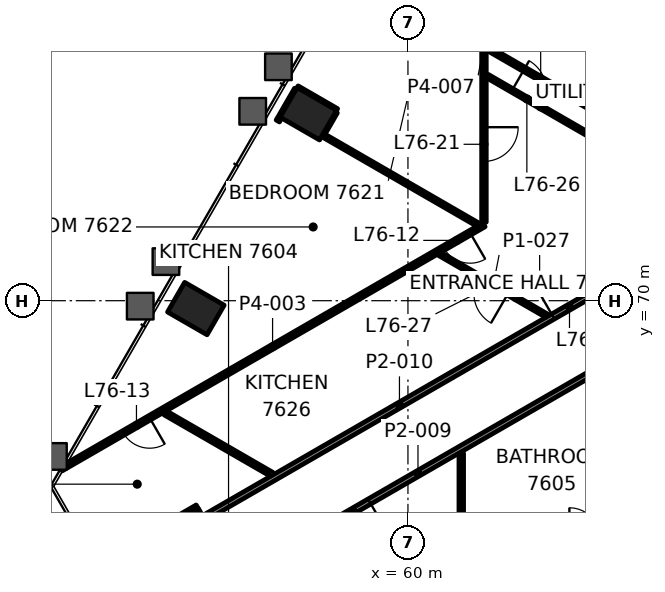
"""IFC4 building model, lengths in metres.
Left out: names, types, materials, properties, quantities, classifications, styles, units other than length and angle.
Written with IfcOpenShell. Run it as: python <this file> out.ifc"""

import sys

from ifc_helpers import new_model, si_unit, direction, frame, frame_2d, origin, origin_2d, place, context, subcontext, project, spatial, rectangle, hollow_rectangle, extrude, element, fill, save


model = new_model("IFC4")
c1 = context("Model", 3, precision=1e-05, world=origin(), true_north=direction((0.0, 1.0)))
c2 = subcontext(c1, "Body", "Model", "MODEL_VIEW")
j1 = project(units=[si_unit("LENGTHUNIT", "METRE"), si_unit("PLANEANGLEUNIT", "RADIAN")], contexts=[c1])
p1 = place(None, origin())
s1 = spatial("IfcSite", under=j1, at=p1, CompositionType="ELEMENT")
p2 = place(p1, origin())
s2 = spatial("IfcBuilding", under=s1, at=p2, CompositionType="ELEMENT")
p3 = place(p2, frame((0.0, 0.0, 312.6)))
s3 = spatial("IfcBuildingStorey", under=s2, at=p3, CompositionType="ELEMENT", Elevation=312.6)
p4 = place(p3, frame((54.039, 62.898, 0.0), z_axis=(0.0, 0.0, 1.0), x_axis=(0.5, -0.866025403784, 0.0)))
e1 = element("IfcColumn", 1, at=p4, inside=s3, PredefinedType="COLUMN", context=c2, shape_type="SweptSolid", body=[
    extrude(rectangle(XDim=2.4, YDim=2.4, at=origin_2d()), origin(), (0.0, 0.0, 1.0), 3.5),
])
for number, where, z_axis, x_axis in (
    (2, (57.379, 74.919, -0.0), (0.0, 0.0, 1.0), (-0.5, -0.866, 0.0)),
    (3, (54.419, 69.793, -0.0), (0.0, 0.0, 1.0), (-0.5, -0.866, 0.0)),
):
    element("IfcColumn", number, at=place(p3, frame(where, z_axis=z_axis, x_axis=x_axis)), inside=s3, PredefinedType="COLUMN", context=c2, shape_type="SweptSolid", body=[
        extrude(hollow_rectangle(XDim=0.9, YDim=1.2, WallThickness=0.06, at=origin_2d()), origin(), (0.0, 0.0, 1.0), 3.5),
    ])
p5 = place(p3, frame((65.0, 68.187, 0.0), z_axis=(0.0, 0.0, 1.0), x_axis=(-0.866028339337, -0.499994915439, 0.0)))
e4 = element("IfcWall", 4, at=p5, inside=s3, PredefinedType="PARTITIONING", context=c2, shape_type="SweptSolid", body=[
    extrude(rectangle(XDim=10.937, YDim=0.15, at=frame_2d((5.468, 0.0))), origin(), (0.0, 0.0, 1.0), 2.697),
])
p6 = place(p5, frame((6.943, 0.0, 0.0)))
e5 = element("IfcOpeningElement", 5, at=p6, cuts=e4, PredefinedType="OPENING", context=c2, shape_type="SweptSolid", body=[
    extrude(rectangle(XDim=1.0, YDim=2.1, at=frame_2d((0.5, 1.05))), frame((0.0, 0.085, 0.0), z_axis=(0.0, -1.0, 0.0), x_axis=(1.0, 0.0, 0.0)), (0.0, 0.0, 1.0), 0.17),
])
p7 = place(p3, frame((54.628, 64.278, 0.0), z_axis=(0.0, 0.0, 1.0), x_axis=(0.866033426221, 0.499986104476, 0.0)))
e6 = element("IfcWall", 6, at=p7, inside=s3, PredefinedType="PARTITIONING", context=c2, shape_type="SweptSolid", body=[
    extrude(rectangle(XDim=11.89, YDim=0.15, at=frame_2d((5.945, 0.0))), origin(), (0.0, 0.0, 1.0), 2.7),
])
p8 = place(p7, frame((10.612, 0.0, 0.0)))
e7 = element("IfcOpeningElement", 7, at=p8, cuts=e6, PredefinedType="OPENING", context=c2, shape_type="SweptSolid", body=[
    extrude(rectangle(XDim=1.0, YDim=2.1, at=frame_2d((0.5, 1.05))), frame((0.0, 0.085, 0.0), z_axis=(0.0, -1.0, 0.0), x_axis=(1.0, 0.0, 0.0)), (0.0, 0.0, 1.0), 0.17),
])
p9 = place(p3, frame((52.4, 63.337, 0.0), z_axis=(0.0, 0.0, 1.0), x_axis=(0.866024647952, 0.500001309137, 0.0)))
e8 = element("IfcWall", 8, at=p9, inside=s3, PredefinedType="PARTITIONING", context=c2, shape_type="SweptSolid", body=[
    extrude(rectangle(XDim=2.4, YDim=0.2, at=frame_2d((1.2, 0.0))), origin(), (0.0, 0.0, 1.0), 2.7),
])
p10 = place(p3, frame((62.0, 71.998, 0.0), z_axis=(0.0, 0.0, 1.0), x_axis=(-0.866023842607, -0.500002704028, 0.0)))
e9 = element("IfcWall", 9, at=p10, inside=s3, PredefinedType="PARTITIONING", context=c2, shape_type="SweptSolid", body=[
    extrude(rectangle(XDim=12.845, YDim=0.12, at=frame_2d((6.422, 0.0))), origin(), (0.0, 0.0, 1.0), 2.7),
])
p11 = place(p10, frame((0.421, 0.0, 0.0)))
e10 = element("IfcOpeningElement", 10, at=p11, cuts=e9, PredefinedType="OPENING", context=c2, shape_type="SweptSolid", body=[
    extrude(rectangle(XDim=0.8, YDim=2.1, at=frame_2d((0.4, 1.05))), frame((0.0, 0.07, 0.0), z_axis=(0.0, -1.0, 0.0), x_axis=(1.0, 0.0, 0.0)), (0.0, 0.0, 1.0), 0.14),
])
p12 = place(p10, frame((10.158, 0.0, 0.0)))
e11 = element("IfcOpeningElement", 11, at=p12, cuts=e9, PredefinedType="OPENING", context=c2, shape_type="SweptSolid", body=[
    extrude(rectangle(XDim=0.8, YDim=2.1, at=frame_2d((0.4, 1.05))), frame((0.0, 0.07, 0.0), z_axis=(0.0, -1.0, 0.0), x_axis=(1.0, 0.0, 0.0)), (0.0, 0.0, 1.0), 0.14),
])
p13 = place(p3, frame((57.776, 74.406, 0.0), z_axis=(0.0, 0.0, 1.0), x_axis=(0.500246099629, 0.865883271467, 0.0)))
e12 = element("IfcWall", 12, at=p13, inside=s3, PredefinedType="PARTITIONING", context=c2, shape_type="SweptSolid", body=[
    extrude(rectangle(XDim=0.646, YDim=0.1, at=frame_2d((0.323, 0.0))), origin(), (0.0, 0.0, 1.0), 2.7),
])
p14 = place(p3, frame((56.576, 74.729, 0.0), z_axis=(0.0, 0.0, 1.0), x_axis=(0.500079715141, 0.865979375335, 0.0)))
e13 = element("IfcWall", 13, at=p14, inside=s3, PredefinedType="PARTITIONING", context=c2, shape_type="SweptSolid", body=[
    extrude(rectangle(XDim=0.966, YDim=0.1, at=frame_2d((0.483, 0.0))), origin(), (0.0, 0.0, 1.0), 2.7),
])
p15 = place(p3, frame((62.0, 81.366, 0.0), z_axis=(0.0, 0.0, 1.0), x_axis=(0.0, -1.0, 0.0)))
e14 = element("IfcWall", 14, at=p15, inside=s3, PredefinedType="PARTITIONING", context=c2, shape_type="SweptSolid", body=[
    extrude(rectangle(XDim=9.299, YDim=0.12, at=frame_2d((4.649, 0.0))), origin(), (0.0, 0.0, 1.0), 2.7),
])
p16 = place(p15, frame((2.033, 0.0, 0.0)))
e15 = element("IfcOpeningElement", 15, at=p16, cuts=e14, PredefinedType="OPENING", context=c2, shape_type="SweptSolid", body=[
    extrude(rectangle(XDim=0.8, YDim=2.1, at=frame_2d((0.4, 1.05))), frame((0.0, 0.07, 0.0), z_axis=(0.0, -1.0, 0.0), x_axis=(1.0, 0.0, 0.0)), (0.0, 0.0, 1.0), 0.14),
])
p17 = place(p15, frame((6.8, 0.0, 0.0)))
e16 = element("IfcOpeningElement", 16, at=p17, cuts=e14, PredefinedType="OPENING", context=c2, shape_type="SweptSolid", body=[
    extrude(rectangle(XDim=0.9, YDim=2.1, at=frame_2d((0.45, 1.05))), frame((0.0, 0.07, 0.0), z_axis=(0.0, -1.0, 0.0), x_axis=(1.0, 0.0, 0.0)), (0.0, 0.0, 1.0), 0.14),
])
p18 = place(p3, frame((61.403, 62.756, 0.0), z_axis=(0.0, 0.0, 1.0), x_axis=(0.0, 1.0, 0.0)))
e17 = element("IfcWall", 17, at=p18, inside=s3, PredefinedType="PARTITIONING", context=c2, shape_type="SweptSolid", body=[
    extrude(rectangle(XDim=3.228, YDim=0.12, at=frame_2d((1.614, 0.0))), origin(), (0.0, 0.0, 1.0), 2.697),
])
p19 = place(p3, frame((64.89, 75.031, 0.0), z_axis=(0.0, 0.0, 1.0), x_axis=(-0.866033195618, 0.499986503906, 0.0)))
e18 = element("IfcWall", 18, at=p19, inside=s3, PredefinedType="PARTITIONING", context=c2, shape_type="SweptSolid", body=[
    extrude(rectangle(XDim=3.228, YDim=0.12, at=frame_2d((1.614, 0.0))), origin(), (0.0, 0.0, 1.0), 2.7),
])
p20 = place(p3, frame((62.086, 75.912, 0.0), z_axis=(0.0, 0.0, 1.0), x_axis=(0.866032882975, -0.499987045439, 0.0)))
e19 = element("IfcWall", 19, at=p20, inside=s3, PredefinedType="PARTITIONING", context=c2, shape_type="SweptSolid", body=[
    extrude(rectangle(XDim=3.248, YDim=0.1, at=frame_2d((1.624, 0.0))), origin(), (0.0, 0.0, 1.0), 2.7),
])
p21 = place(p20, frame((0.754, 0.0, 0.0)))
e20 = element("IfcOpeningElement", 20, at=p21, cuts=e19, PredefinedType="OPENING", context=c2, shape_type="SweptSolid", body=[
    extrude(rectangle(XDim=0.9, YDim=2.1, at=frame_2d((0.45, 1.05))), frame((0.0, 0.06, 0.0), z_axis=(0.0, -1.0, 0.0), x_axis=(1.0, 0.0, 0.0)), (0.0, 0.0, 1.0), 0.12),
])
p22 = place(p3, frame((58.124, 75.01, 0.0), z_axis=(0.0, 0.0, 1.0), x_axis=(-0.865978732077, 0.500080829057, 0.0)))
e21 = element("IfcWall", 21, at=p22, inside=s3, PredefinedType="PARTITIONING", context=c2, shape_type="SweptSolid", body=[
    extrude(rectangle(XDim=1.199, YDim=0.1, at=frame_2d((0.6, 0.0))), origin(), (0.0, 0.0, 1.0), 2.688),
])
p23 = place(p3, frame((61.837, 72.003, 0.0), z_axis=(0.0, 0.0, 1.0), x_axis=(-0.86602790099, 0.499995674689, 0.0)))
e22 = element("IfcWall", 22, at=p23, inside=s3, PredefinedType="PARTITIONING", context=c2, shape_type="SweptSolid", body=[
    extrude(rectangle(XDim=4.718, YDim=0.1, at=frame_2d((2.359, 0.0))), origin(), (0.0, 0.0, 1.0), 2.7),
])
p24 = place(p3, frame((63.652, 69.604, 0.0), z_axis=(0.0, 0.0, 1.0), x_axis=(-0.866032882975, 0.499987045439, 0.0)))
e23 = element("IfcWall", 23, at=p24, inside=s3, PredefinedType="PARTITIONING", context=c2, shape_type="SweptSolid", body=[
    extrude(rectangle(XDim=3.248, YDim=0.1, at=frame_2d((1.624, 0.0))), origin(), (0.0, 0.0, 1.0), 2.7),
])
p25 = place(p24, frame((1.174, 0.0, 0.0)))
e24 = element("IfcOpeningElement", 24, at=p25, cuts=e23, PredefinedType="OPENING", context=c2, shape_type="SweptSolid", body=[
    extrude(rectangle(XDim=0.9, YDim=2.1, at=frame_2d((0.45, 1.05))), frame((0.0, 0.06, 0.0), z_axis=(0.0, -1.0, 0.0), x_axis=(1.0, 0.0, 0.0)), (0.0, 0.0, 1.0), 0.12),
])
p26 = place(p3, frame((56.41, 65.433, 0.0), z_axis=(0.0, 0.0, 1.0), x_axis=(-0.866000447062, 0.500043223821, 0.0)))
e25 = element("IfcWall", 25, at=p26, inside=s3, PredefinedType="PARTITIONING", context=c2, shape_type="SweptSolid", body=[
    extrude(rectangle(XDim=3.228, YDim=0.12, at=frame_2d((1.614, 0.0))), origin(), (0.0, 0.0, 1.0), 2.7),
])
p27 = place(p6, origin())
e26 = element("IfcDoor", 26, at=p27, inside=s3, OperationType="SINGLE_SWING_LEFT", PredefinedType="DOOR", context=c2, shape_type="SweptSolid", body=[
    extrude(rectangle(XDim=1.0, YDim=2.1, at=frame_2d((0.5, 1.05))), frame((0.0, 0.025, 0.0), z_axis=(0.0, -1.0, 0.0), x_axis=(1.0, 0.0, 0.0)), (0.0, 0.0, 1.0), 0.05),
])
fill(e5, e26)
p28 = place(p8, origin())
e27 = element("IfcDoor", 27, at=p28, inside=s3, OperationType="SINGLE_SWING_RIGHT", PredefinedType="DOOR", context=c2, shape_type="SweptSolid", body=[
    extrude(rectangle(XDim=1.0, YDim=2.1, at=frame_2d((0.5, 1.05))), frame((0.0, 0.025, 0.0), z_axis=(0.0, -1.0, 0.0), x_axis=(1.0, 0.0, 0.0)), (0.0, 0.0, 1.0), 0.05),
])
fill(e7, e27)
p29 = place(p11, origin())
e28 = element("IfcDoor", 28, at=p29, inside=s3, OperationType="SINGLE_SWING_RIGHT", PredefinedType="DOOR", context=c2, shape_type="SweptSolid", body=[
    extrude(rectangle(XDim=0.8, YDim=2.1, at=frame_2d((0.4, 1.05))), frame((0.0, 0.025, 0.0), z_axis=(0.0, -1.0, 0.0), x_axis=(1.0, 0.0, 0.0)), (0.0, 0.0, 1.0), 0.05),
])
fill(e10, e28)
p30 = place(p12, origin())
e29 = element("IfcDoor", 29, at=p30, inside=s3, OperationType="SINGLE_SWING_RIGHT", PredefinedType="DOOR", context=c2, shape_type="SweptSolid", body=[
    extrude(rectangle(XDim=0.8, YDim=2.1, at=frame_2d((0.4, 1.05))), frame((0.0, 0.025, 0.0), z_axis=(0.0, -1.0, 0.0), x_axis=(1.0, 0.0, 0.0)), (0.0, 0.0, 1.0), 0.05),
])
fill(e11, e29)
p31 = place(p17, origin())
e30 = element("IfcDoor", 30, at=p31, inside=s3, OperationType="SINGLE_SWING_RIGHT", PredefinedType="DOOR", context=c2, shape_type="SweptSolid", body=[
    extrude(rectangle(XDim=0.9, YDim=2.1, at=frame_2d((0.45, 1.05))), frame((0.0, 0.025, 0.0), z_axis=(0.0, -1.0, 0.0), x_axis=(1.0, 0.0, 0.0)), (0.0, 0.0, 1.0), 0.05),
])
fill(e16, e30)
p32 = place(p21, origin())
e31 = element("IfcDoor", 31, at=p32, inside=s3, OperationType="SINGLE_SWING_LEFT", PredefinedType="DOOR", context=c2, shape_type="SweptSolid", body=[
    extrude(rectangle(XDim=0.9, YDim=2.1, at=frame_2d((0.45, 1.05))), frame((0.0, 0.025, 0.0), z_axis=(0.0, -1.0, 0.0), x_axis=(1.0, 0.0, 0.0)), (0.0, 0.0, 1.0), 0.05),
])
fill(e20, e31)
p33 = place(p25, origin())
e32 = element("IfcDoor", 32, at=p33, inside=s3, OperationType="SINGLE_SWING_RIGHT", PredefinedType="DOOR", context=c2, shape_type="SweptSolid", body=[
    extrude(rectangle(XDim=0.9, YDim=2.1, at=frame_2d((0.45, 1.05))), frame((0.0, 0.025, 0.0), z_axis=(0.0, -1.0, 0.0), x_axis=(1.0, 0.0, 0.0)), (0.0, 0.0, 1.0), 0.05),
])
fill(e24, e32)
save(model, sys.argv[1])
